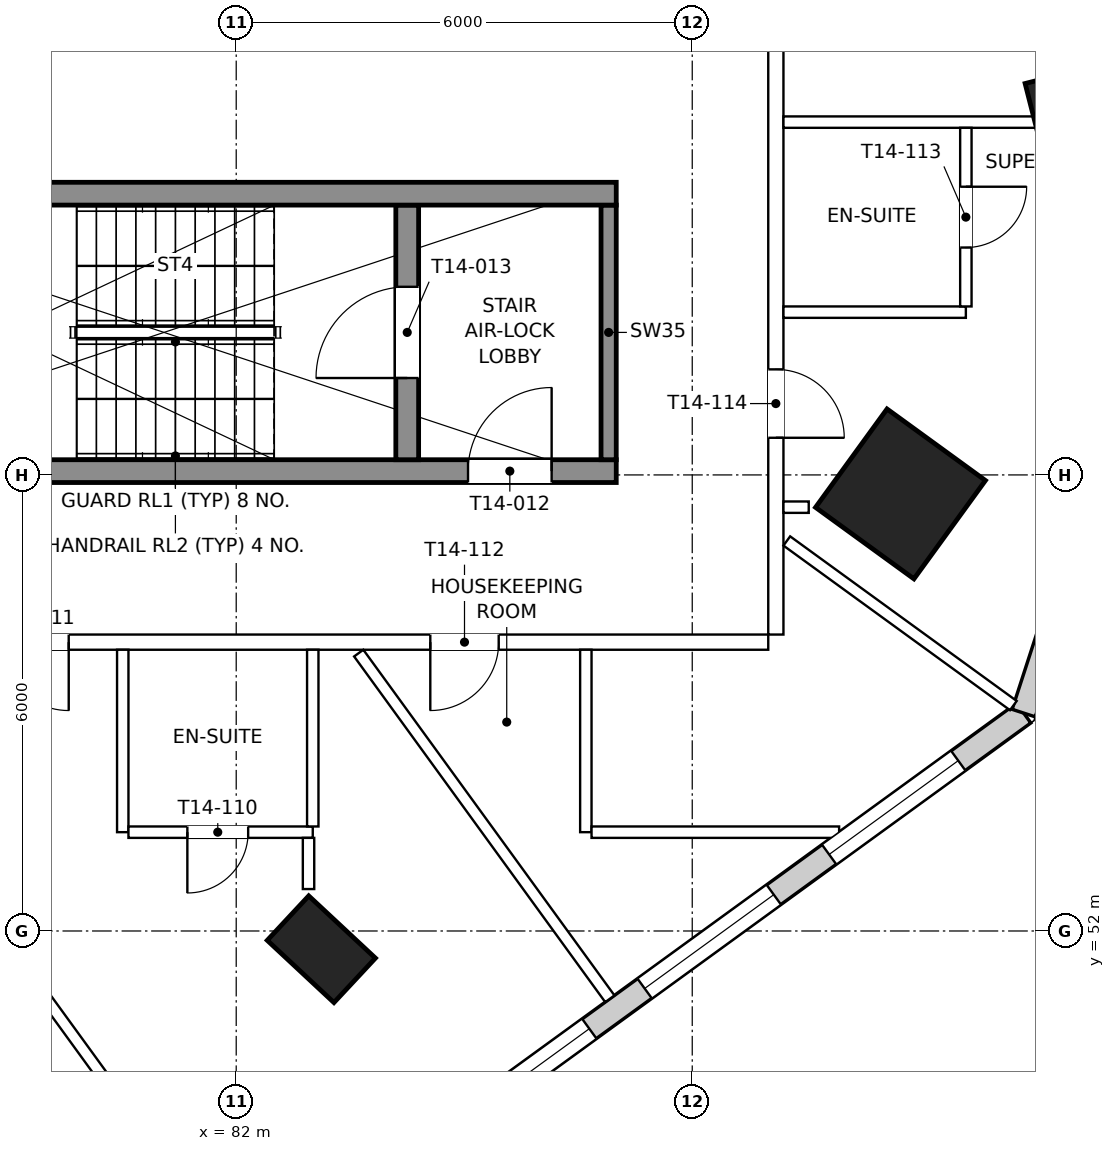
"""IFC4 building model, lengths in metres.
Left out: names, types, materials, properties, quantities, classifications, styles, units other than length and angle.
Written with IfcOpenShell. Run it as: python <this file> out.ifc"""

import sys

from ifc_helpers import new_model, si_unit, direction, frame, frame_2d, origin, origin_2d, place, context, subcontext, project, spatial, rectangle, extrude, element, fill, save


model = new_model("IFC4")
c1 = context("Model", 3, precision=1e-05, world=origin(), true_north=direction((0.0, 1.0)))
c2 = subcontext(c1, "Body", "Model", "MODEL_VIEW")
j1 = project(units=[si_unit("LENGTHUNIT", "METRE"), si_unit("PLANEANGLEUNIT", "RADIAN")], contexts=[c1])
p1 = place(None, origin())
s1 = spatial("IfcSite", under=j1, at=p1, CompositionType="ELEMENT")
p2 = place(p1, origin())
s2 = spatial("IfcBuilding", under=s1, at=p2, CompositionType="ELEMENT")
p3 = place(p2, frame((0.0, 0.0, 204.3)))
s3 = spatial("IfcBuildingStorey", under=s2, at=p3, CompositionType="ELEMENT", Elevation=204.3)
p4 = place(p3, frame((83.12, 51.76, 0.0), z_axis=(0.0, 0.0, 1.0), x_axis=(-0.681998360062, -0.731353701619, 0.0)))
e1 = element("IfcColumn", 1, at=p4, inside=s3, PredefinedType="COLUMN", context=c2, shape_type="SweptSolid", body=[
    extrude(rectangle(XDim=0.8, YDim=1.2, at=origin_2d()), origin(), (0.0, 0.0, 1.0), 3.9),
])
p5 = place(p3, frame((90.74, 57.75, 0.0), z_axis=(0.0, 0.0, 1.0), x_axis=(0.809016994375, -0.587785252292, 0.0)))
e2 = element("IfcColumn", 2, at=p5, inside=s3, PredefinedType="COLUMN", context=c2, shape_type="SweptSolid", body=[
    extrude(rectangle(XDim=1.6, YDim=1.6, at=origin_2d()), origin(), (0.0, 0.0, 1.0), 3.9),
])
p6 = place(p3, frame((93.06, 62.91, 0.0), z_axis=(0.0, 0.0, 1.0), x_axis=(0.246880623275, -0.969045900797, 0.0)))
e3 = element("IfcColumn", 3, at=p6, inside=s3, PredefinedType="COLUMN", context=c2, shape_type="SweptSolid", body=[
    extrude(rectangle(XDim=0.8, YDim=1.2, at=origin_2d()), origin(), (0.0, 0.0, 1.0), 3.9),
])
p7 = place(p3, frame((74.378, 41.801, 0.0), z_axis=(0.0, 0.0, 1.0), x_axis=(0.809017634756, 0.587784370883, 0.0)))
e4 = element("IfcWall", 4, at=p7, inside=s3, PredefinedType="SOLIDWALL", context=c2, shape_type="SweptSolid", body=[
    extrude(rectangle(XDim=22.229, YDim=0.32, at=frame_2d((11.114, 0.0))), origin(), (0.0, 0.0, 1.0), 3.6),
])
p8 = place(p7, frame((1.064, 0.0, 0.75)))
e5 = element("IfcOpeningElement", 5, at=p8, cuts=e4, PredefinedType="OPENING", context=c2, shape_type="SweptSolid", body=[
    extrude(rectangle(XDim=2.1, YDim=2.1, at=frame_2d((1.05, 1.05))), frame((0.0, 0.17, 0.0), z_axis=(0.0, -1.0, 0.0), x_axis=(1.0, 0.0, 0.0)), (0.0, 0.0, 1.0), 0.34),
])
p9 = place(p7, frame((4.064, 0.0, 0.75)))
e6 = element("IfcOpeningElement", 6, at=p9, cuts=e4, PredefinedType="OPENING", context=c2, shape_type="SweptSolid", body=[
    extrude(rectangle(XDim=2.1, YDim=2.1, at=frame_2d((1.05, 1.05))), frame((0.0, 0.17, 0.0), z_axis=(0.0, -1.0, 0.0), x_axis=(1.0, 0.0, 0.0)), (0.0, 0.0, 1.0), 0.34),
])
p10 = place(p7, frame((7.064, 0.0, 0.75)))
e7 = element("IfcOpeningElement", 7, at=p10, cuts=e4, PredefinedType="OPENING", context=c2, shape_type="SweptSolid", body=[
    extrude(rectangle(XDim=2.1, YDim=2.1, at=frame_2d((1.05, 1.05))), frame((0.0, 0.17, 0.0), z_axis=(0.0, -1.0, 0.0), x_axis=(1.0, 0.0, 0.0)), (0.0, 0.0, 1.0), 0.34),
])
p11 = place(p7, frame((10.064, 0.0, 0.75)))
e8 = element("IfcOpeningElement", 8, at=p11, cuts=e4, PredefinedType="OPENING", context=c2, shape_type="SweptSolid", body=[
    extrude(rectangle(XDim=2.1, YDim=2.1, at=frame_2d((1.05, 1.05))), frame((0.0, 0.17, 0.0), z_axis=(0.0, -1.0, 0.0), x_axis=(1.0, 0.0, 0.0)), (0.0, 0.0, 1.0), 0.34),
])
p12 = place(p7, frame((13.064, 0.0, 0.75)))
e9 = element("IfcOpeningElement", 9, at=p12, cuts=e4, PredefinedType="OPENING", context=c2, shape_type="SweptSolid", body=[
    extrude(rectangle(XDim=2.1, YDim=2.1, at=frame_2d((1.05, 1.05))), frame((0.0, 0.17, 0.0), z_axis=(0.0, -1.0, 0.0), x_axis=(1.0, 0.0, 0.0)), (0.0, 0.0, 1.0), 0.34),
])
p13 = place(p7, frame((16.064, 0.0, 0.75)))
e10 = element("IfcOpeningElement", 10, at=p13, cuts=e4, PredefinedType="OPENING", context=c2, shape_type="SweptSolid", body=[
    extrude(rectangle(XDim=2.1, YDim=2.1, at=frame_2d((1.05, 1.05))), frame((0.0, 0.17, 0.0), z_axis=(0.0, -1.0, 0.0), x_axis=(1.0, 0.0, 0.0)), (0.0, 0.0, 1.0), 0.34),
])
p14 = place(p7, frame((19.064, 0.0, 0.75)))
e11 = element("IfcOpeningElement", 11, at=p14, cuts=e4, PredefinedType="OPENING", context=c2, shape_type="SweptSolid", body=[
    extrude(rectangle(XDim=2.1, YDim=2.1, at=frame_2d((1.05, 1.05))), frame((0.0, 0.17, 0.0), z_axis=(0.0, -1.0, 0.0), x_axis=(1.0, 0.0, 0.0)), (0.0, 0.0, 1.0), 0.34),
])
p15 = place(p3, frame((92.361, 54.867, 0.0), z_axis=(0.0, 0.0, 1.0), x_axis=(0.309006387978, 0.951059962457, 0.0)))
e12 = element("IfcWall", 12, at=p15, inside=s3, PredefinedType="SOLIDWALL", context=c2, shape_type="SweptSolid", body=[
    extrude(rectangle(XDim=8.175, YDim=0.32, at=frame_2d((4.087, 0.0))), origin(), (0.0, 0.0, 1.0), 3.6),
])
p16 = place(p15, frame((1.488, 0.0, 0.75)))
e13 = element("IfcOpeningElement", 13, at=p16, cuts=e12, PredefinedType="OPENING", context=c2, shape_type="SweptSolid", body=[
    extrude(rectangle(XDim=2.2, YDim=2.1, at=frame_2d((1.1, 1.05))), frame((0.0, 0.17, 0.0), z_axis=(0.0, -1.0, 0.0), x_axis=(1.0, 0.0, 0.0)), (0.0, 0.0, 1.0), 0.34),
])
p17 = place(p15, frame((4.488, 0.0, 0.75)))
e14 = element("IfcOpeningElement", 14, at=p17, cuts=e12, PredefinedType="OPENING", context=c2, shape_type="SweptSolid", body=[
    extrude(rectangle(XDim=2.2, YDim=2.1, at=frame_2d((1.1, 1.05))), frame((0.0, 0.17, 0.0), z_axis=(0.0, -1.0, 0.0), x_axis=(1.0, 0.0, 0.0)), (0.0, 0.0, 1.0), 0.34),
])
p18 = place(p3, frame((94.887, 62.642, 0.0), z_axis=(0.0, 0.0, 1.0), x_axis=(-0.309019087741, 0.951055836117, 0.0)))
e15 = element("IfcWall", 15, at=p18, inside=s3, PredefinedType="SOLIDWALL", context=c2, shape_type="SweptSolid", body=[
    extrude(rectangle(XDim=21.18, YDim=0.32, at=frame_2d((10.59, 0.0))), origin(), (0.0, 0.0, 1.0), 3.6),
])
p19 = place(p18, frame((2.04, 0.0, 0.75)))
e16 = element("IfcOpeningElement", 16, at=p19, cuts=e15, PredefinedType="OPENING", context=c2, shape_type="SweptSolid", body=[
    extrude(rectangle(XDim=2.1, YDim=2.1, at=frame_2d((1.05, 1.05))), frame((0.0, 0.17, 0.0), z_axis=(0.0, -1.0, 0.0), x_axis=(1.0, 0.0, 0.0)), (0.0, 0.0, 1.0), 0.34),
])
p20 = place(p18, frame((5.04, 0.0, 0.75)))
e17 = element("IfcOpeningElement", 17, at=p20, cuts=e15, PredefinedType="OPENING", context=c2, shape_type="SweptSolid", body=[
    extrude(rectangle(XDim=2.1, YDim=2.1, at=frame_2d((1.05, 1.05))), frame((0.0, 0.17, 0.0), z_axis=(0.0, -1.0, 0.0), x_axis=(1.0, 0.0, 0.0)), (0.0, 0.0, 1.0), 0.34),
])
p21 = place(p18, frame((8.14, 0.0, 0.75)))
e18 = element("IfcOpeningElement", 18, at=p21, cuts=e15, PredefinedType="OPENING", context=c2, shape_type="SweptSolid", body=[
    extrude(rectangle(XDim=2.1, YDim=2.1, at=frame_2d((1.05, 1.05))), frame((0.0, 0.17, 0.0), z_axis=(0.0, -1.0, 0.0), x_axis=(1.0, 0.0, 0.0)), (0.0, 0.0, 1.0), 0.34),
])
p22 = place(p18, frame((11.19, 0.0, 0.9)))
e19 = element("IfcOpeningElement", 19, at=p22, cuts=e15, PredefinedType="OPENING", context=c2, shape_type="SweptSolid", body=[
    extrude(rectangle(XDim=1.6, YDim=1.8, at=frame_2d((0.8, 0.9))), frame((0.0, 0.17, 0.0), z_axis=(0.0, -1.0, 0.0), x_axis=(1.0, 0.0, 0.0)), (0.0, 0.0, 1.0), 0.34),
])
p23 = place(p18, frame((14.04, 0.0, 0.75)))
e20 = element("IfcOpeningElement", 20, at=p23, cuts=e15, PredefinedType="OPENING", context=c2, shape_type="SweptSolid", body=[
    extrude(rectangle(XDim=2.1, YDim=2.1, at=frame_2d((1.05, 1.05))), frame((0.0, 0.17, 0.0), z_axis=(0.0, -1.0, 0.0), x_axis=(1.0, 0.0, 0.0)), (0.0, 0.0, 1.0), 0.34),
])
p24 = place(p18, frame((17.04, 0.0, 0.75)))
e21 = element("IfcOpeningElement", 21, at=p24, cuts=e15, PredefinedType="OPENING", context=c2, shape_type="SweptSolid", body=[
    extrude(rectangle(XDim=2.1, YDim=2.1, at=frame_2d((1.05, 1.05))), frame((0.0, 0.17, 0.0), z_axis=(0.0, -1.0, 0.0), x_axis=(1.0, 0.0, 0.0)), (0.0, 0.0, 1.0), 0.34),
])
p25 = place(p3, frame((75.1, 58.05, 0.0), z_axis=(0.0, 0.0, 1.0), x_axis=(1.0, 0.0, 0.0)))
e22 = element("IfcWall", 22, at=p25, inside=s3, PredefinedType="SHEAR", context=c2, shape_type="SweptSolid", body=[
    extrude(rectangle(XDim=11.9, YDim=0.3, at=frame_2d((5.95, 0.0))), origin(), (0.0, 0.0, 1.0), 3.9),
])
p26 = place(p25, frame((9.95, 0.0, 0.0)))
e23 = element("IfcOpeningElement", 23, at=p26, cuts=e22, PredefinedType="OPENING", context=c2, shape_type="SweptSolid", body=[
    extrude(rectangle(XDim=1.1, YDim=2.1, at=frame_2d((0.55, 1.05))), frame((0.0, 0.16, 0.0), z_axis=(0.0, -1.0, 0.0), x_axis=(1.0, 0.0, 0.0)), (0.0, 0.0, 1.0), 0.32),
])
p27 = place(p3, frame((84.25, 58.2, 0.0), z_axis=(0.0, 0.0, 1.0), x_axis=(0.0, 1.0, 0.0)))
e24 = element("IfcWall", 24, at=p27, inside=s3, PredefinedType="SHEAR", context=c2, shape_type="SweptSolid", body=[
    extrude(rectangle(XDim=3.35, YDim=0.3, at=frame_2d((1.675, 0.0))), origin(), (0.0, 0.0, 1.0), 3.9),
])
p28 = place(p27, frame((1.075, 0.0, 0.0)))
e25 = element("IfcOpeningElement", 25, at=p28, cuts=e24, PredefinedType="OPENING", context=c2, shape_type="SweptSolid", body=[
    extrude(rectangle(XDim=1.2, YDim=2.1, at=frame_2d((0.6, 1.05))), frame((0.0, 0.16, 0.0), z_axis=(0.0, -1.0, 0.0), x_axis=(1.0, 0.0, 0.0)), (0.0, 0.0, 1.0), 0.32),
])
p29 = place(p3, frame((86.9, 58.2, 0.0), z_axis=(0.0, 0.0, 1.0), x_axis=(0.0, 1.0, 0.0)))
e26 = element("IfcWall", 26, at=p29, inside=s3, PredefinedType="SHEAR", context=c2, shape_type="SweptSolid", body=[
    extrude(rectangle(XDim=3.35, YDim=0.2, at=frame_2d((1.675, 0.0))), origin(), (0.0, 0.0, 1.0), 3.9),
])
p30 = place(p3, frame((75.1, 61.7, 0.0), z_axis=(0.0, 0.0, 1.0), x_axis=(1.0, 0.0, 0.0)))
e27 = element("IfcWall", 27, at=p30, inside=s3, PredefinedType="SHEAR", context=c2, shape_type="SweptSolid", body=[
    extrude(rectangle(XDim=11.9, YDim=0.3, at=frame_2d((5.95, 0.0))), origin(), (0.0, 0.0, 1.0), 3.9),
])
p31 = place(p3, frame((89.1, 63.85, 0.0), z_axis=(0.0, 0.0, 1.0), x_axis=(0.0, -1.0, 0.0)))
e28 = element("IfcWall", 28, at=p31, inside=s3, PredefinedType="PARTITIONING", context=c2, shape_type="SweptSolid", body=[
    extrude(rectangle(XDim=7.95, YDim=0.2, at=frame_2d((3.975, 0.0))), origin(), (0.0, 0.0, 1.0), 2.9),
])
p32 = place(p31, frame((4.461, 0.0, 0.0)))
e29 = element("IfcOpeningElement", 29, at=p32, cuts=e28, PredefinedType="OPENING", context=c2, shape_type="SweptSolid", body=[
    extrude(rectangle(XDim=0.9, YDim=2.1, at=frame_2d((0.45, 1.05))), frame((0.0, 0.11, 0.0), z_axis=(0.0, -1.0, 0.0), x_axis=(1.0, 0.0, 0.0)), (0.0, 0.0, 1.0), 0.22),
])
p33 = place(p3, frame((89.0, 55.8, 0.0), z_axis=(0.0, 0.0, 1.0), x_axis=(-1.0, 0.0, 0.0)))
e30 = element("IfcWall", 30, at=p33, inside=s3, PredefinedType="PARTITIONING", context=c2, shape_type="SweptSolid", body=[
    extrude(rectangle(XDim=11.382, YDim=0.2, at=frame_2d((5.691, 0.0))), origin(), (0.0, 0.0, 1.0), 2.9),
])
p34 = place(p33, frame((9.204, 0.0, 0.0)))
e31 = element("IfcOpeningElement", 31, at=p34, cuts=e30, PredefinedType="OPENING", context=c2, shape_type="SweptSolid", body=[
    extrude(rectangle(XDim=0.9, YDim=2.1, at=frame_2d((0.45, 1.05))), frame((0.0, 0.11, 0.0), z_axis=(0.0, -1.0, 0.0), x_axis=(1.0, 0.0, 0.0)), (0.0, 0.0, 1.0), 0.22),
])
p35 = place(p33, frame((3.546, 0.0, 0.0)))
e32 = element("IfcOpeningElement", 32, at=p35, cuts=e30, PredefinedType="OPENING", context=c2, shape_type="SweptSolid", body=[
    extrude(rectangle(XDim=0.9, YDim=2.1, at=frame_2d((0.45, 1.05))), frame((0.0, 0.11, 0.0), z_axis=(0.0, -1.0, 0.0), x_axis=(1.0, 0.0, 0.0)), (0.0, 0.0, 1.0), 0.22),
])
p36 = place(p3, frame((92.225, 54.966, 0.0), z_axis=(0.0, 0.0, 1.0), x_axis=(-0.809028266422, 0.587769737338, 0.0)))
e33 = element("IfcWall", 33, at=p36, inside=s3, PredefinedType="PARTITIONING", context=c2, shape_type="SweptSolid", body=[
    extrude(rectangle(XDim=3.684, YDim=0.15, at=frame_2d((1.842, 0.0))), origin(), (0.0, 0.0, 1.0), 2.9),
])
p37 = place(p3, frame((94.719, 62.642, 0.0), z_axis=(0.0, 0.0, 1.0), x_axis=(-1.0, 0.0, 0.0)))
e34 = element("IfcWall", 34, at=p37, inside=s3, PredefinedType="PARTITIONING", context=c2, shape_type="SweptSolid", body=[
    extrude(rectangle(XDim=5.519, YDim=0.15, at=frame_2d((2.76, 0.0))), origin(), (0.0, 0.0, 1.0), 3.6),
])
p38 = place(p3, frame((82.062, 47.582, 0.0), z_axis=(0.0, 0.0, 1.0), x_axis=(-0.587777877013, 0.809022352778, 0.0)))
e35 = element("IfcWall", 35, at=p38, inside=s3, PredefinedType="PARTITIONING", context=c2, shape_type="SweptSolid", body=[
    extrude(rectangle(XDim=9.18, YDim=0.15, at=frame_2d((4.59, 0.0))), origin(), (0.0, 0.0, 1.0), 3.6),
])
p39 = place(p3, frame((86.916, 51.108, 0.0), z_axis=(0.0, 0.0, 1.0), x_axis=(-0.587804932614, 0.809002695419, 0.0)))
e36 = element("IfcWall", 36, at=p39, inside=s3, PredefinedType="PARTITIONING", context=c2, shape_type="SweptSolid", body=[
    extrude(rectangle(XDim=5.621, YDim=0.15, at=frame_2d((2.811, 0.0))), origin(), (0.0, 0.0, 1.0), 2.9),
])
p40 = place(p3, frame((80.507, 55.7, 0.0), z_axis=(0.0, 0.0, 1.0), x_axis=(0.0, -1.0, 0.0)))
e37 = element("IfcWall", 37, at=p40, inside=s3, PredefinedType="PARTITIONING", context=c2, shape_type="SweptSolid", body=[
    extrude(rectangle(XDim=2.4, YDim=0.15, at=frame_2d((1.2, 0.0))), origin(), (0.0, 0.0, 1.0), 3.6),
])
p41 = place(p3, frame((83.007, 53.3, 0.0), z_axis=(0.0, 0.0, 1.0), x_axis=(-1.0, 0.0, 0.0)))
e38 = element("IfcWall", 38, at=p41, inside=s3, PredefinedType="PARTITIONING", context=c2, shape_type="SweptSolid", body=[
    extrude(rectangle(XDim=2.425, YDim=0.15, at=frame_2d((1.212, 0.0))), origin(), (0.0, 0.0, 1.0), 3.15),
])
p42 = place(p41, frame((0.85, 0.0, 0.0)))
e39 = element("IfcOpeningElement", 39, at=p42, cuts=e38, PredefinedType="OPENING", context=c2, shape_type="SweptSolid", body=[
    extrude(rectangle(XDim=0.8, YDim=2.1, at=frame_2d((0.4, 1.05))), frame((0.0, 0.085, 0.0), z_axis=(0.0, -1.0, 0.0), x_axis=(1.0, 0.0, 0.0)), (0.0, 0.0, 1.0), 0.17),
])
p43 = place(p3, frame((83.007, 55.7, 0.0), z_axis=(0.0, 0.0, 1.0), x_axis=(0.0, -1.0, 0.0)))
e40 = element("IfcWall", 40, at=p43, inside=s3, PredefinedType="PARTITIONING", context=c2, shape_type="SweptSolid", body=[
    extrude(rectangle(XDim=2.325, YDim=0.15, at=frame_2d((1.163, 0.0))), origin(), (0.0, 0.0, 1.0), 3.15),
])
p44 = place(p3, frame((86.6, 55.7, 0.0), z_axis=(0.0, 0.0, 1.0), x_axis=(0.0, -1.0, 0.0)))
e41 = element("IfcWall", 41, at=p44, inside=s3, PredefinedType="PARTITIONING", context=c2, shape_type="SweptSolid", body=[
    extrude(rectangle(XDim=2.4, YDim=0.15, at=frame_2d((1.2, 0.0))), origin(), (0.0, 0.0, 1.0), 2.9),
])
p45 = place(p3, frame((89.933, 53.3, 0.0), z_axis=(0.0, 0.0, 1.0), x_axis=(-1.0, 0.0, 0.0)))
e42 = element("IfcWall", 42, at=p45, inside=s3, PredefinedType="PARTITIONING", context=c2, shape_type="SweptSolid", body=[
    extrude(rectangle(XDim=3.258, YDim=0.15, at=frame_2d((1.629, 0.0))), origin(), (0.0, 0.0, 1.0), 3.6),
])
p46 = place(p3, frame((89.2, 60.142, 0.0), z_axis=(0.0, 0.0, 1.0), x_axis=(1.0, 0.0, 0.0)))
e43 = element("IfcWall", 43, at=p46, inside=s3, PredefinedType="PARTITIONING", context=c2, shape_type="SweptSolid", body=[
    extrude(rectangle(XDim=2.4, YDim=0.15, at=frame_2d((1.2, 0.0))), origin(), (0.0, 0.0, 1.0), 3.6),
])
p47 = place(p3, frame((91.6, 62.567, 0.0), z_axis=(0.0, 0.0, 1.0), x_axis=(0.0, -1.0, 0.0)))
e44 = element("IfcWall", 44, at=p47, inside=s3, PredefinedType="PARTITIONING", context=c2, shape_type="SweptSolid", body=[
    extrude(rectangle(XDim=2.35, YDim=0.15, at=frame_2d((1.175, 0.0))), origin(), (0.0, 0.0, 1.0), 3.6),
])
p48 = place(p47, frame((0.775, 0.0, 0.0)))
e45 = element("IfcOpeningElement", 45, at=p48, cuts=e44, PredefinedType="OPENING", context=c2, shape_type="SweptSolid", body=[
    extrude(rectangle(XDim=0.8, YDim=2.1, at=frame_2d((0.4, 1.05))), frame((0.0, 0.085, 0.0), z_axis=(0.0, -1.0, 0.0), x_axis=(1.0, 0.0, 0.0)), (0.0, 0.0, 1.0), 0.17),
])
p49 = place(p3, frame((82.951, 52.552, 0.0), z_axis=(0.0, 0.0, 1.0), x_axis=(0.0, 1.0, 0.0)))
e46 = element("IfcWall", 46, at=p49, inside=s3, PredefinedType="PARTITIONING", context=c2, shape_type="SweptSolid", body=[
    extrude(rectangle(XDim=0.673, YDim=0.15, at=frame_2d((0.337, 0.0))), origin(), (0.0, 0.0, 1.0), 3.15),
])
p50 = place(p3, frame((89.533, 57.576, 0.0), z_axis=(0.0, 0.0, 1.0), x_axis=(-1.0, 0.0, 0.0)))
e47 = element("IfcWall", 47, at=p50, inside=s3, PredefinedType="PARTITIONING", context=c2, shape_type="SweptSolid", body=[
    extrude(rectangle(XDim=0.333, YDim=0.15, at=frame_2d((0.167, 0.0))), origin(), (0.0, 0.0, 1.0), 3.6),
])
p51 = place(p12, origin())
e48 = element("IfcWindow", 48, at=p51, inside=s3, PartitioningType="SINGLE_PANEL", PredefinedType="WINDOW", context=c2, shape_type="SweptSolid", body=[
    extrude(rectangle(XDim=2.1, YDim=2.1, at=frame_2d((1.05, 1.05))), frame((0.0, 0.07, 0.0), z_axis=(0.0, -1.0, 0.0), x_axis=(1.0, 0.0, 0.0)), (0.0, 0.0, 1.0), 0.06),
])
fill(e9, e48)
p52 = place(p13, origin())
e49 = element("IfcWindow", 49, at=p52, inside=s3, PartitioningType="SINGLE_PANEL", PredefinedType="WINDOW", context=c2, shape_type="SweptSolid", body=[
    extrude(rectangle(XDim=2.1, YDim=2.1, at=frame_2d((1.05, 1.05))), frame((0.0, 0.07, 0.0), z_axis=(0.0, -1.0, 0.0), x_axis=(1.0, 0.0, 0.0)), (0.0, 0.0, 1.0), 0.06),
])
fill(e10, e49)
p53 = place(p14, origin())
e50 = element("IfcWindow", 50, at=p53, inside=s3, PartitioningType="SINGLE_PANEL", PredefinedType="WINDOW", context=c2, shape_type="SweptSolid", body=[
    extrude(rectangle(XDim=2.1, YDim=2.1, at=frame_2d((1.05, 1.05))), frame((0.0, 0.07, 0.0), z_axis=(0.0, -1.0, 0.0), x_axis=(1.0, 0.0, 0.0)), (0.0, 0.0, 1.0), 0.06),
])
fill(e11, e50)
p54 = place(p26, origin())
e51 = element("IfcDoor", 51, at=p54, inside=s3, OperationType="SINGLE_SWING_RIGHT", PredefinedType="DOOR", context=c2, shape_type="SweptSolid", body=[
    extrude(rectangle(XDim=1.1, YDim=2.1, at=frame_2d((0.55, 1.05))), frame((0.0, 0.025, 0.0), z_axis=(0.0, -1.0, 0.0), x_axis=(1.0, 0.0, 0.0)), (0.0, 0.0, 1.0), 0.05),
])
fill(e23, e51)
p55 = place(p28, origin())
e52 = element("IfcDoor", 52, at=p55, inside=s3, OperationType="SINGLE_SWING_LEFT", PredefinedType="DOOR", context=c2, shape_type="SweptSolid", body=[
    extrude(rectangle(XDim=1.2, YDim=2.1, at=frame_2d((0.6, 1.05))), frame((0.0, 0.025, 0.0), z_axis=(0.0, -1.0, 0.0), x_axis=(1.0, 0.0, 0.0)), (0.0, 0.0, 1.0), 0.05),
])
fill(e25, e52)
p56 = place(p42, origin())
e53 = element("IfcDoor", 53, at=p56, inside=s3, OperationType="SINGLE_SWING_RIGHT", PredefinedType="DOOR", context=c2, shape_type="SweptSolid", body=[
    extrude(rectangle(XDim=0.8, YDim=2.1, at=frame_2d((0.4, 1.05))), frame((0.0, 0.025, 0.0), z_axis=(0.0, -1.0, 0.0), x_axis=(1.0, 0.0, 0.0)), (0.0, 0.0, 1.0), 0.05),
])
fill(e39, e53)
p57 = place(p34, origin())
e54 = element("IfcDoor", 54, at=p57, inside=s3, OperationType="SINGLE_SWING_LEFT", PredefinedType="DOOR", context=c2, shape_type="SweptSolid", body=[
    extrude(rectangle(XDim=0.9, YDim=2.1, at=frame_2d((0.45, 1.05))), frame((0.0, 0.025, 0.0), z_axis=(0.0, -1.0, 0.0), x_axis=(1.0, 0.0, 0.0)), (0.0, 0.0, 1.0), 0.05),
])
fill(e31, e54)
p58 = place(p35, origin())
e55 = element("IfcDoor", 55, at=p58, inside=s3, OperationType="SINGLE_SWING_RIGHT", PredefinedType="DOOR", context=c2, shape_type="SweptSolid", body=[
    extrude(rectangle(XDim=0.9, YDim=2.1, at=frame_2d((0.45, 1.05))), frame((0.0, 0.025, 0.0), z_axis=(0.0, -1.0, 0.0), x_axis=(1.0, 0.0, 0.0)), (0.0, 0.0, 1.0), 0.05),
])
fill(e32, e55)
p59 = place(p48, origin())
e56 = element("IfcDoor", 56, at=p59, inside=s3, OperationType="SINGLE_SWING_LEFT", PredefinedType="DOOR", context=c2, shape_type="SweptSolid", body=[
    extrude(rectangle(XDim=0.8, YDim=2.1, at=frame_2d((0.4, 1.05))), frame((0.0, 0.025, 0.0), z_axis=(0.0, -1.0, 0.0), x_axis=(1.0, 0.0, 0.0)), (0.0, 0.0, 1.0), 0.05),
])
fill(e45, e56)
p60 = place(p32, origin())
e57 = element("IfcDoor", 57, at=p60, inside=s3, OperationType="SINGLE_SWING_RIGHT", PredefinedType="DOOR", context=c2, shape_type="SweptSolid", body=[
    extrude(rectangle(XDim=0.9, YDim=2.1, at=frame_2d((0.45, 1.05))), frame((0.0, 0.025, 0.0), z_axis=(0.0, -1.0, 0.0), x_axis=(1.0, 0.0, 0.0)), (0.0, 0.0, 1.0), 0.05),
])
fill(e29, e57)
save(model, sys.argv[1])
